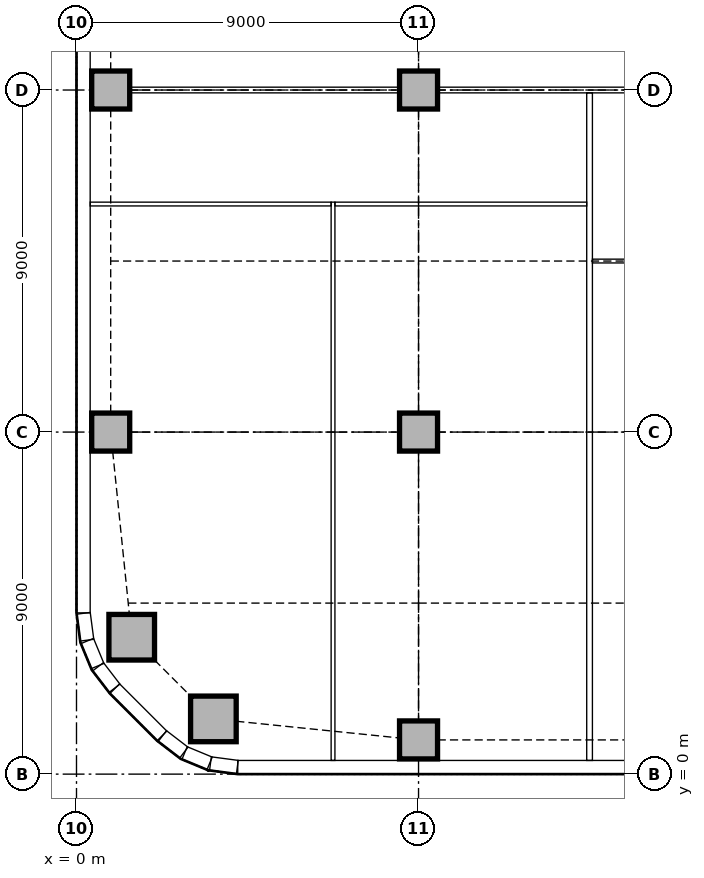
"""IFC4 building model, lengths in metres.
Left out: names, types, materials, properties, quantities, classifications, styles, units other than length and angle.
Written with IfcOpenShell. Run it as: python <this file> out.ifc"""

import sys

from ifc_helpers import new_model, si_unit, direction, frame, frame_2d, origin, origin_2d, place, context, subcontext, project, spatial, rectangle, extrude, element, fill, save


model = new_model("IFC4")
c1 = context("Model", 3, precision=1e-05, world=origin(), true_north=direction((0.0, 1.0)))
c2 = subcontext(c1, "Body", "Model", "MODEL_VIEW")
j1 = project(units=[si_unit("LENGTHUNIT", "METRE"), si_unit("PLANEANGLEUNIT", "RADIAN")], contexts=[c1])
p1 = place(None, origin())
s1 = spatial("IfcSite", under=j1, at=p1, CompositionType="ELEMENT")
p2 = place(p1, origin())
s2 = spatial("IfcBuilding", under=s1, at=p2, CompositionType="ELEMENT")
p3 = place(p2, frame((0.0, 0.0, 26.0)))
s3 = spatial("IfcBuildingStorey", under=s2, at=p3, CompositionType="ELEMENT", Elevation=26.0)
for number, where, z_axis, x_axis in (
    (1, (3.602, 1.453, 0.0), (0.0, 0.0, 1.0), (1.0, 0.0, 0.0)),
    (2, (1.453, 3.602, 0.0), (0.0, 0.0, 1.0), (1.0, 0.0, 0.0)),
):
    element("IfcColumn", number, at=place(p3, frame(where, z_axis=z_axis, x_axis=x_axis)), inside=s3, PredefinedType="COLUMN", context=c2, shape_type="SweptSolid", body=[
        extrude(rectangle(XDim=1.2, YDim=1.2, at=origin_2d()), origin(), (0.0, 0.0, 1.0), 3.85),
    ])
for number, where, z_axis, x_axis in (
    (3, (9.0, 0.9, 0.0), (0.0, 0.0, 1.0), (1.0, 0.0, 0.0)),
    (4, (0.9, 9.0, 0.0), (0.0, 0.0, 1.0), (1.0, 0.0, 0.0)),
    (5, (0.9, 18.0, 0.0), (0.0, 0.0, 1.0), (1.0, 0.0, 0.0)),
    (6, (9.0, 9.0, 0.0), (0.0, 0.0, 1.0), (1.0, 0.0, 0.0)),
    (7, (9.0, 18.0, 0.0), (0.0, 0.0, 1.0), (1.0, 0.0, 0.0)),
):
    element("IfcColumn", number, at=place(p3, frame(where, z_axis=z_axis, x_axis=x_axis)), inside=s3, PredefinedType="COLUMN", context=c2, shape_type="SweptSolid", body=[
        extrude(rectangle(XDim=1.0, YDim=1.0, at=origin_2d()), origin(), (0.0, 0.0, 1.0), 3.85),
    ])
p4 = place(p3, frame((4.243, 0.18, 0.0), z_axis=(0.0, 0.0, 1.0), x_axis=(1.0, 0.0, 0.0)))
e8 = element("IfcWall", 8, at=p4, inside=s3, PredefinedType="STANDARD", context=c2, shape_type="SweptSolid", body=[
    extrude(rectangle(XDim=44.015, YDim=0.36, at=frame_2d((22.007, 0.0))), origin(), (0.0, 0.0, 1.0), 3.85),
])
p5 = place(p4, frame((2.707, 0.0, 0.9)))
e9 = element("IfcOpeningElement", 9, at=p5, cuts=e8, PredefinedType="OPENING", context=c2, shape_type="SweptSolid", body=[
    extrude(rectangle(XDim=3.3, YDim=1.6, at=frame_2d((1.65, 0.8))), frame((0.0, 0.19, 0.0), z_axis=(0.0, -1.0, 0.0), x_axis=(1.0, 0.0, 0.0)), (0.0, 0.0, 1.0), 0.38),
])
p6 = place(p4, frame((7.157, 0.0, 0.0)))
e10 = element("IfcOpeningElement", 10, at=p6, cuts=e8, PredefinedType="OPENING", context=c2, shape_type="SweptSolid", body=[
    extrude(rectangle(XDim=1.8, YDim=2.4, at=frame_2d((0.9, 1.2))), frame((0.0, 0.19, 0.0), z_axis=(0.0, -1.0, 0.0), x_axis=(1.0, 0.0, 0.0)), (0.0, 0.0, 1.0), 0.38),
])
p7 = place(p4, frame((11.357, 0.0, 0.9)))
e11 = element("IfcOpeningElement", 11, at=p7, cuts=e8, PredefinedType="OPENING", context=c2, shape_type="SweptSolid", body=[
    extrude(rectangle(XDim=3.3, YDim=1.6, at=frame_2d((1.65, 0.8))), frame((0.0, 0.19, 0.0), z_axis=(0.0, -1.0, 0.0), x_axis=(1.0, 0.0, 0.0)), (0.0, 0.0, 1.0), 0.38),
])
p8 = place(p4, frame((16.307, 0.0, 0.9)))
e12 = element("IfcOpeningElement", 12, at=p8, cuts=e8, PredefinedType="OPENING", context=c2, shape_type="SweptSolid", body=[
    extrude(rectangle(XDim=1.8, YDim=1.6, at=frame_2d((0.9, 0.8))), frame((0.0, 0.19, 0.0), z_axis=(0.0, -1.0, 0.0), x_axis=(1.0, 0.0, 0.0)), (0.0, 0.0, 1.0), 0.38),
])
p9 = place(p4, frame((20.357, 0.0, 0.9)))
e13 = element("IfcOpeningElement", 13, at=p9, cuts=e8, PredefinedType="OPENING", context=c2, shape_type="SweptSolid", body=[
    extrude(rectangle(XDim=3.3, YDim=1.6, at=frame_2d((1.65, 0.8))), frame((0.0, 0.19, 0.0), z_axis=(0.0, -1.0, 0.0), x_axis=(1.0, 0.0, 0.0)), (0.0, 0.0, 1.0), 0.38),
])
p10 = place(p4, frame((25.307, 0.0, 0.9)))
e14 = element("IfcOpeningElement", 14, at=p10, cuts=e8, PredefinedType="OPENING", context=c2, shape_type="SweptSolid", body=[
    extrude(rectangle(XDim=1.8, YDim=1.6, at=frame_2d((0.9, 0.8))), frame((0.0, 0.19, 0.0), z_axis=(0.0, -1.0, 0.0), x_axis=(1.0, 0.0, 0.0)), (0.0, 0.0, 1.0), 0.38),
])
p11 = place(p4, frame((29.357, 0.0, 0.9)))
e15 = element("IfcOpeningElement", 15, at=p11, cuts=e8, PredefinedType="OPENING", context=c2, shape_type="SweptSolid", body=[
    extrude(rectangle(XDim=3.3, YDim=1.6, at=frame_2d((1.65, 0.8))), frame((0.0, 0.19, 0.0), z_axis=(0.0, -1.0, 0.0), x_axis=(1.0, 0.0, 0.0)), (0.0, 0.0, 1.0), 0.38),
])
p12 = place(p4, frame((33.857, 0.0, 0.9)))
e16 = element("IfcOpeningElement", 16, at=p12, cuts=e8, PredefinedType="OPENING", context=c2, shape_type="SweptSolid", body=[
    extrude(rectangle(XDim=3.3, YDim=1.6, at=frame_2d((1.65, 0.8))), frame((0.0, 0.19, 0.0), z_axis=(0.0, -1.0, 0.0), x_axis=(1.0, 0.0, 0.0)), (0.0, 0.0, 1.0), 0.38),
])
p13 = place(p4, frame((38.357, 0.0, 0.9)))
e17 = element("IfcOpeningElement", 17, at=p13, cuts=e8, PredefinedType="OPENING", context=c2, shape_type="SweptSolid", body=[
    extrude(rectangle(XDim=3.3, YDim=1.6, at=frame_2d((1.65, 0.8))), frame((0.0, 0.19, 0.0), z_axis=(0.0, -1.0, 0.0), x_axis=(1.0, 0.0, 0.0)), (0.0, 0.0, 1.0), 0.38),
])
p14 = place(p3, frame((0.18, 21.0, 0.0), z_axis=(0.0, 0.0, 1.0), x_axis=(0.0, -1.0, 0.0)))
e18 = element("IfcWall", 18, at=p14, inside=s3, PredefinedType="STANDARD", context=c2, shape_type="SweptSolid", body=[
    extrude(rectangle(XDim=16.757, YDim=0.36, at=frame_2d((8.379, 0.0))), origin(), (0.0, 0.0, 1.0), 3.85),
])
p15 = place(p14, frame((1.35, 0.0, 0.9)))
e19 = element("IfcOpeningElement", 19, at=p15, cuts=e18, PredefinedType="OPENING", context=c2, shape_type="SweptSolid", body=[
    extrude(rectangle(XDim=3.3, YDim=1.6, at=frame_2d((1.65, 0.8))), frame((0.0, 0.19, 0.0), z_axis=(0.0, -1.0, 0.0), x_axis=(1.0, 0.0, 0.0)), (0.0, 0.0, 1.0), 0.38),
])
p16 = place(p14, frame((6.15, 0.0, 0.9)))
e20 = element("IfcOpeningElement", 20, at=p16, cuts=e18, PredefinedType="OPENING", context=c2, shape_type="SweptSolid", body=[
    extrude(rectangle(XDim=3.3, YDim=1.6, at=frame_2d((1.65, 0.8))), frame((0.0, 0.19, 0.0), z_axis=(0.0, -1.0, 0.0), x_axis=(1.0, 0.0, 0.0)), (0.0, 0.0, 1.0), 0.38),
])
p17 = place(p14, frame((10.35, 0.0, 0.9)))
e21 = element("IfcOpeningElement", 21, at=p17, cuts=e18, PredefinedType="OPENING", context=c2, shape_type="SweptSolid", body=[
    extrude(rectangle(XDim=3.3, YDim=1.6, at=frame_2d((1.65, 0.8))), frame((0.0, 0.19, 0.0), z_axis=(0.0, -1.0, 0.0), x_axis=(1.0, 0.0, 0.0)), (0.0, 0.0, 1.0), 0.38),
])
p18 = place(p3, frame((1.006, 2.249, 0.0), z_axis=(0.0, 0.0, 1.0), x_axis=(0.707106781187, -0.707106781187, 0.0)))
e22 = element("IfcWall", 22, at=p18, inside=s3, PredefinedType="STANDARD", context=c2, shape_type="SweptSolid", body=[
    extrude(rectangle(XDim=1.757, YDim=0.36, at=frame_2d((0.879, 0.0))), origin(), (0.0, 0.0, 1.0), 3.85),
])
for number, where, z_axis, x_axis in (
    (23, (0.183, 4.231, 0.0), (0.0, 0.0, 1.0), (0.131, -0.991, 0.0)),
    (24, (0.282, 3.503, 0.0), (0.0, 0.0, 1.0), (0.383, -0.924, 0.0)),
):
    element("IfcWall", number, at=place(p3, frame(where, z_axis=z_axis, x_axis=x_axis)), inside=s3, PredefinedType="STANDARD", context=c2, shape_type="SweptSolid", body=[
        extrude(rectangle(XDim=0.713, YDim=0.36, at=frame_2d((0.356, 0.0))), origin(), (0.0, 0.0, 1.0), 3.85),
    ])
for number, where, z_axis, x_axis in (
    (25, (0.566, 2.825, 0.0), (0.0, 0.0, 1.0), (0.609, -0.793, 0.0)),
    (26, (2.259, 1.0, 0.0), (0.0, 0.0, 1.0), (0.793, -0.609, 0.0)),
):
    element("IfcWall", number, at=place(p3, frame(where, z_axis=z_axis, x_axis=x_axis)), inside=s3, PredefinedType="STANDARD", context=c2, shape_type="SweptSolid", body=[
        extrude(rectangle(XDim=0.713, YDim=0.36, at=frame_2d((0.357, 0.0))), origin(), (0.0, 0.0, 1.0), 3.85),
    ])
for number, where, z_axis, x_axis in (
    (27, (2.844, 0.555, 0.0), (0.0, 0.0, 1.0), (0.924, -0.383, 0.0)),
    (28, (3.524, 0.276, 0.0), (0.0, 0.0, 1.0), (0.991, -0.131, 0.0)),
):
    element("IfcWall", number, at=place(p3, frame(where, z_axis=z_axis, x_axis=x_axis)), inside=s3, PredefinedType="STANDARD", context=c2, shape_type="SweptSolid", body=[
        extrude(rectangle(XDim=0.713, YDim=0.36, at=frame_2d((0.356, 0.0))), origin(), (0.0, 0.0, 1.0), 3.85),
    ])
p19 = place(p3, frame((9.5, 18.0, 0.0), z_axis=(0.0, 0.0, 1.0), x_axis=(1.0, 0.0, 0.0)))
e29 = element("IfcWall", 29, at=p19, inside=s3, PredefinedType="PARTITIONING", context=c2, shape_type="SweptSolid", body=[
    extrude(rectangle(XDim=8.0, YDim=0.15, at=frame_2d((4.0, 0.0))), origin(), (0.0, 0.0, 1.0), 3.15),
])
p20 = place(p3, frame((1.4, 18.0, 0.0), z_axis=(0.0, 0.0, 1.0), x_axis=(1.0, 0.0, 0.0)))
e30 = element("IfcWall", 30, at=p20, inside=s3, PredefinedType="PARTITIONING", context=c2, shape_type="SweptSolid", body=[
    extrude(rectangle(XDim=7.1, YDim=0.15, at=frame_2d((3.55, 0.0))), origin(), (0.0, 0.0, 1.0), 3.15),
])
p21 = place(p20, frame((3.05, 0.0, 0.0)))
e31 = element("IfcOpeningElement", 31, at=p21, cuts=e30, PredefinedType="OPENING", context=c2, shape_type="SweptSolid", body=[
    extrude(rectangle(XDim=1.0, YDim=2.1, at=frame_2d((0.5, 1.05))), frame((0.0, 0.085, 0.0), z_axis=(0.0, -1.0, 0.0), x_axis=(1.0, 0.0, 0.0)), (0.0, 0.0, 1.0), 0.17),
])
p22 = place(p3, frame((13.5, 0.36, 0.0), z_axis=(0.0, 0.0, 1.0), x_axis=(0.0, 1.0, 0.0)))
e32 = element("IfcWall", 32, at=p22, inside=s3, PredefinedType="PARTITIONING", context=c2, shape_type="SweptSolid", body=[
    extrude(rectangle(XDim=17.565, YDim=0.15, at=frame_2d((8.783, 0.0))), origin(), (0.0, 0.0, 1.0), 3.85),
])
p23 = place(p3, frame((13.575, 13.5, 0.0), z_axis=(0.0, 0.0, 1.0), x_axis=(1.0, 0.0, 0.0)))
e33 = element("IfcWall", 33, at=p23, inside=s3, PredefinedType="PARTITIONING", context=c2, shape_type="SweptSolid", body=[
    extrude(rectangle(XDim=17.975, YDim=0.1, at=frame_2d((8.988, 0.0))), origin(), (0.0, 0.0, 1.0), 3.35),
])
p24 = place(p23, frame((4.1, 0.0, 0.0)))
e34 = element("IfcOpeningElement", 34, at=p24, cuts=e33, PredefinedType="OPENING", context=c2, shape_type="SweptSolid", body=[
    extrude(rectangle(XDim=0.9, YDim=2.1, at=frame_2d((0.45, 1.05))), frame((0.0, 0.06, 0.0), z_axis=(0.0, -1.0, 0.0), x_axis=(1.0, 0.0, 0.0)), (0.0, 0.0, 1.0), 0.12),
])
p25 = place(p23, frame((12.925, 0.0, 0.0)))
e35 = element("IfcOpeningElement", 35, at=p25, cuts=e33, PredefinedType="OPENING", context=c2, shape_type="SweptSolid", body=[
    extrude(rectangle(XDim=0.9, YDim=2.1, at=frame_2d((0.45, 1.05))), frame((0.0, 0.06, 0.0), z_axis=(0.0, -1.0, 0.0), x_axis=(1.0, 0.0, 0.0)), (0.0, 0.0, 1.0), 0.12),
])
p26 = place(p3, frame((6.75, 0.36, 0.0), z_axis=(0.0, 0.0, 1.0), x_axis=(0.0, 1.0, 0.0)))
e36 = element("IfcWall", 36, at=p26, inside=s3, PredefinedType="PARTITIONING", context=c2, shape_type="SweptSolid", body=[
    extrude(rectangle(XDim=14.69, YDim=0.1, at=frame_2d((7.345, 0.0))), origin(), (0.0, 0.0, 1.0), 3.85),
])
p27 = place(p3, frame((6.8, 15.0, 0.0), z_axis=(0.0, 0.0, 1.0), x_axis=(1.0, 0.0, 0.0)))
e37 = element("IfcWall", 37, at=p27, inside=s3, PredefinedType="PARTITIONING", context=c2, shape_type="SweptSolid", body=[
    extrude(rectangle(XDim=6.625, YDim=0.1, at=frame_2d((3.312, 0.0))), origin(), (0.0, 0.0, 1.0), 3.85),
])
p28 = place(p27, frame((2.85, 0.0, 0.0)))
e38 = element("IfcOpeningElement", 38, at=p28, cuts=e37, PredefinedType="OPENING", context=c2, shape_type="SweptSolid", body=[
    extrude(rectangle(XDim=0.9, YDim=2.1, at=frame_2d((0.45, 1.05))), frame((0.0, 0.06, 0.0), z_axis=(0.0, -1.0, 0.0), x_axis=(1.0, 0.0, 0.0)), (0.0, 0.0, 1.0), 0.12),
])
p29 = place(p3, frame((0.36, 15.0, 0.0), z_axis=(0.0, 0.0, 1.0), x_axis=(1.0, 0.0, 0.0)))
e39 = element("IfcWall", 39, at=p29, inside=s3, PredefinedType="PARTITIONING", context=c2, shape_type="SweptSolid", body=[
    extrude(rectangle(XDim=6.34, YDim=0.1, at=frame_2d((3.17, 0.0))), origin(), (0.0, 0.0, 1.0), 3.85),
])
p30 = place(p29, frame((2.7, 0.0, 0.0)))
e40 = element("IfcOpeningElement", 40, at=p30, cuts=e39, PredefinedType="OPENING", context=c2, shape_type="SweptSolid", body=[
    extrude(rectangle(XDim=0.9, YDim=2.1, at=frame_2d((0.45, 1.05))), frame((0.0, 0.06, 0.0), z_axis=(0.0, -1.0, 0.0), x_axis=(1.0, 0.0, 0.0)), (0.0, 0.0, 1.0), 0.12),
])
p31 = place(p5, origin())
e41 = element("IfcWindow", 41, at=p31, inside=s3, PartitioningType="SINGLE_PANEL", PredefinedType="WINDOW", context=c2, shape_type="SweptSolid", body=[
    extrude(rectangle(XDim=3.3, YDim=1.6, at=frame_2d((1.65, 0.8))), frame((0.0, 0.13, 0.0), z_axis=(0.0, -1.0, 0.0), x_axis=(1.0, 0.0, 0.0)), (0.0, 0.0, 1.0), 0.06),
])
fill(e9, e41)
p32 = place(p6, frame((1.8, 0.0, 0.0), z_axis=(0.0, 0.0, 1.0), x_axis=(-1.0, 0.0, 0.0)))
e42 = element("IfcDoor", 42, at=p32, inside=s3, OperationType="DOUBLE_DOOR_SINGLE_SWING", PredefinedType="DOOR", context=c2, shape_type="SweptSolid", body=[
    extrude(rectangle(XDim=1.8, YDim=2.4, at=frame_2d((0.9, 1.2))), frame((0.0, -0.07, 0.0), z_axis=(0.0, -1.0, 0.0), x_axis=(1.0, 0.0, 0.0)), (0.0, 0.0, 1.0), 0.05),
])
fill(e10, e42)
p33 = place(p15, origin())
e43 = element("IfcWindow", 43, at=p33, inside=s3, PartitioningType="SINGLE_PANEL", PredefinedType="WINDOW", context=c2, shape_type="SweptSolid", body=[
    extrude(rectangle(XDim=3.3, YDim=1.6, at=frame_2d((1.65, 0.8))), frame((0.0, 0.13, 0.0), z_axis=(0.0, -1.0, 0.0), x_axis=(1.0, 0.0, 0.0)), (0.0, 0.0, 1.0), 0.06),
])
fill(e19, e43)
p34 = place(p16, origin())
e44 = element("IfcWindow", 44, at=p34, inside=s3, PartitioningType="SINGLE_PANEL", PredefinedType="WINDOW", context=c2, shape_type="SweptSolid", body=[
    extrude(rectangle(XDim=3.3, YDim=1.6, at=frame_2d((1.65, 0.8))), frame((0.0, 0.13, 0.0), z_axis=(0.0, -1.0, 0.0), x_axis=(1.0, 0.0, 0.0)), (0.0, 0.0, 1.0), 0.06),
])
fill(e20, e44)
p35 = place(p17, origin())
e45 = element("IfcWindow", 45, at=p35, inside=s3, PartitioningType="SINGLE_PANEL", PredefinedType="WINDOW", context=c2, shape_type="SweptSolid", body=[
    extrude(rectangle(XDim=3.3, YDim=1.6, at=frame_2d((1.65, 0.8))), frame((0.0, 0.13, 0.0), z_axis=(0.0, -1.0, 0.0), x_axis=(1.0, 0.0, 0.0)), (0.0, 0.0, 1.0), 0.06),
])
fill(e21, e45)
p36 = place(p21, frame((1.0, 0.0, 0.0), z_axis=(0.0, 0.0, 1.0), x_axis=(-1.0, 0.0, 0.0)))
e46 = element("IfcDoor", 46, at=p36, inside=s3, OperationType="SINGLE_SWING_RIGHT", PredefinedType="DOOR", context=c2, shape_type="SweptSolid", body=[
    extrude(rectangle(XDim=1.0, YDim=2.1, at=frame_2d((0.5, 1.05))), frame((0.0, 0.025, 0.0), z_axis=(0.0, -1.0, 0.0), x_axis=(1.0, 0.0, 0.0)), (0.0, 0.0, 1.0), 0.05),
])
fill(e31, e46)
p37 = place(p30, origin())
e47 = element("IfcDoor", 47, at=p37, inside=s3, OperationType="SINGLE_SWING_RIGHT", PredefinedType="DOOR", context=c2, shape_type="SweptSolid", body=[
    extrude(rectangle(XDim=0.9, YDim=2.1, at=frame_2d((0.45, 1.05))), frame((0.0, 0.025, 0.0), z_axis=(0.0, -1.0, 0.0), x_axis=(1.0, 0.0, 0.0)), (0.0, 0.0, 1.0), 0.05),
])
fill(e40, e47)
p38 = place(p28, origin())
e48 = element("IfcDoor", 48, at=p38, inside=s3, OperationType="SINGLE_SWING_RIGHT", PredefinedType="DOOR", context=c2, shape_type="SweptSolid", body=[
    extrude(rectangle(XDim=0.9, YDim=2.1, at=frame_2d((0.45, 1.05))), frame((0.0, 0.025, 0.0), z_axis=(0.0, -1.0, 0.0), x_axis=(1.0, 0.0, 0.0)), (0.0, 0.0, 1.0), 0.05),
])
fill(e38, e48)
save(model, sys.argv[1])
